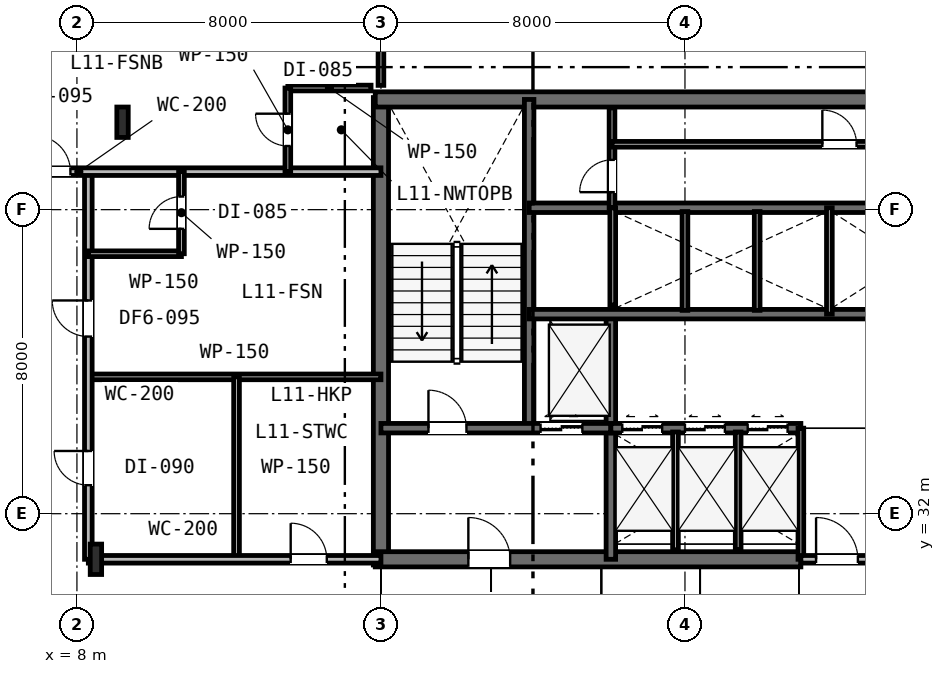
"""IFC4 building model, lengths in metres.
Left out: names, types, materials, properties, quantities, classifications, styles, units other than length and angle.
Written with IfcOpenShell. Run it as: python <this file> out.ifc"""

import sys

from ifc_helpers import new_model, si_unit, direction, frame, frame_2d, origin, origin_2d, place, context, subcontext, project, spatial, rectangle, i_section, extrude, element, fill, save


model = new_model("IFC4")
c1 = context("Model", 3, precision=1e-05, world=origin(), true_north=direction((0.0, 1.0)))
c2 = subcontext(c1, "Body", "Model", "MODEL_VIEW")
j1 = project(units=[si_unit("LENGTHUNIT", "METRE"), si_unit("PLANEANGLEUNIT", "RADIAN")], contexts=[c1])
p1 = place(None, origin())
s1 = spatial("IfcSite", under=j1, at=p1, CompositionType="ELEMENT")
p2 = place(p1, origin())
s2 = spatial("IfcBuilding", under=s1, at=p2, CompositionType="ELEMENT")
p3 = place(p2, frame((0.0, 0.0, 47.4)))
s3 = spatial("IfcBuildingStorey", under=s2, at=p3, CompositionType="ELEMENT", Elevation=47.4)
p4 = place(p3, frame((16.0, 30.65, 0.0), z_axis=(0.0, 0.0, 1.0), x_axis=(0.0, 1.0, 0.0)))
e1 = element("IfcWall", 1, at=p4, inside=s3, PredefinedType="SHEAR", context=c2, shape_type="SweptSolid", body=[
    extrude(rectangle(XDim=12.3, YDim=0.4, at=frame_2d((6.15, 0.0))), origin(), (0.0, 0.0, 1.0), 3.6),
])
p5 = place(p3, frame((15.85, 42.9, 0.0), z_axis=(0.0, 0.0, 1.0), x_axis=(1.0, 0.0, 0.0)))
e2 = element("IfcWall", 2, at=p5, inside=s3, PredefinedType="SHEAR", context=c2, shape_type="SweptSolid", body=[
    extrude(rectangle(XDim=24.3, YDim=0.4, at=frame_2d((12.15, 0.0))), origin(), (0.0, 0.0, 1.0), 3.6),
])
p6 = place(p3, frame((15.85, 30.8, 0.0), z_axis=(0.0, 0.0, 1.0), x_axis=(1.0, 0.0, 0.0)))
e3 = element("IfcWall", 3, at=p6, inside=s3, PredefinedType="SHEAR", context=c2, shape_type="SweptSolid", body=[
    extrude(rectangle(XDim=11.2, YDim=0.4, at=frame_2d((5.6, 0.0))), origin(), (0.0, 0.0, 1.0), 3.6),
])
p7 = place(p6, frame((2.45, 0.0, 0.0)))
e4 = element("IfcOpeningElement", 4, at=p7, cuts=e3, PredefinedType="OPENING", context=c2, shape_type="SweptSolid", body=[
    extrude(rectangle(XDim=1.1, YDim=2.15, at=frame_2d((0.55, 1.075))), frame((0.0, 0.21, 0.0), z_axis=(0.0, -1.0, 0.0), x_axis=(1.0, 0.0, 0.0)), (0.0, 0.0, 1.0), 0.42),
])
p8 = place(p3, frame((19.9, 34.25, 0.0), z_axis=(0.0, 0.0, 1.0), x_axis=(0.0, 1.0, 0.0)))
e5 = element("IfcWall", 5, at=p8, inside=s3, PredefinedType="SHEAR", context=c2, shape_type="SweptSolid", body=[
    extrude(rectangle(XDim=8.65, YDim=0.25, at=frame_2d((4.325, 0.0))), origin(), (0.0, 0.0, 1.0), 3.6),
])
p9 = place(p3, frame((22.05, 30.8, 0.0), z_axis=(0.0, 0.0, 1.0), x_axis=(0.0, 1.0, 0.0)))
e6 = element("IfcWall", 6, at=p9, inside=s3, PredefinedType="SHEAR", context=c2, shape_type="SweptSolid", body=[
    extrude(rectangle(XDim=6.45, YDim=0.25, at=frame_2d((3.225, 0.0))), origin(), (0.0, 0.0, 1.0), 3.6),
])
p10 = place(p3, frame((16.0, 34.25, 0.0), z_axis=(0.0, 0.0, 1.0), x_axis=(1.0, 0.0, 0.0)))
e7 = element("IfcWall", 7, at=p10, inside=s3, PredefinedType="SHEAR", context=c2, shape_type="SweptSolid", body=[
    extrude(rectangle(XDim=6.05, YDim=0.25, at=frame_2d((3.025, 0.0))), origin(), (0.0, 0.0, 1.0), 3.6),
])
p11 = place(p10, frame((1.25, 0.0, 0.0)))
e8 = element("IfcOpeningElement", 8, at=p11, cuts=e7, PredefinedType="OPENING", context=c2, shape_type="SweptSolid", body=[
    extrude(rectangle(XDim=1.0, YDim=2.15, at=frame_2d((0.5, 1.075))), frame((0.0, 0.135, 0.0), z_axis=(0.0, -1.0, 0.0), x_axis=(1.0, 0.0, 0.0)), (0.0, 0.0, 1.0), 0.27),
])
p12 = place(p10, frame((4.2, 0.0, 0.0)))
e9 = element("IfcOpeningElement", 9, at=p12, cuts=e7, PredefinedType="OPENING", context=c2, shape_type="SweptSolid", body=[
    extrude(rectangle(XDim=1.1, YDim=2.15, at=frame_2d((0.55, 1.075))), frame((0.0, 0.135, 0.0), z_axis=(0.0, -1.0, 0.0), x_axis=(1.0, 0.0, 0.0)), (0.0, 0.0, 1.0), 0.27),
])
p13 = place(p3, frame((22.05, 34.25, 0.0), z_axis=(0.0, 0.0, 1.0), x_axis=(1.0, 0.0, 0.0)))
e10 = element("IfcWall", 10, at=p13, inside=s3, PredefinedType="SHEAR", context=c2, shape_type="SweptSolid", body=[
    extrude(rectangle(XDim=5.0, YDim=0.25, at=frame_2d((2.5, 0.0))), origin(), (0.0, 0.0, 1.0), 3.6),
])
p14 = place(p13, frame((0.3, 0.0, 0.0)))
e11 = element("IfcOpeningElement", 11, at=p14, cuts=e10, PredefinedType="OPENING", context=c2, shape_type="SweptSolid", body=[
    extrude(rectangle(XDim=1.05, YDim=2.15, at=frame_2d((0.525, 1.075))), frame((0.0, 0.135, 0.0), z_axis=(0.0, -1.0, 0.0), x_axis=(1.0, 0.0, 0.0)), (0.0, 0.0, 1.0), 0.27),
])
p15 = place(p13, frame((1.95, 0.0, 0.0)))
e12 = element("IfcOpeningElement", 12, at=p15, cuts=e10, PredefinedType="OPENING", context=c2, shape_type="SweptSolid", body=[
    extrude(rectangle(XDim=1.05, YDim=2.15, at=frame_2d((0.525, 1.075))), frame((0.0, 0.135, 0.0), z_axis=(0.0, -1.0, 0.0), x_axis=(1.0, 0.0, 0.0)), (0.0, 0.0, 1.0), 0.27),
])
p16 = place(p13, frame((3.6, 0.0, 0.0)))
e13 = element("IfcOpeningElement", 13, at=p16, cuts=e10, PredefinedType="OPENING", context=c2, shape_type="SweptSolid", body=[
    extrude(rectangle(XDim=1.05, YDim=2.15, at=frame_2d((0.525, 1.075))), frame((0.0, 0.135, 0.0), z_axis=(0.0, -1.0, 0.0), x_axis=(1.0, 0.0, 0.0)), (0.0, 0.0, 1.0), 0.27),
])
p17 = place(p3, frame((19.9, 37.25, 0.0), z_axis=(0.0, 0.0, 1.0), x_axis=(1.0, 0.0, 0.0)))
e14 = element("IfcWall", 14, at=p17, inside=s3, PredefinedType="SHEAR", context=c2, shape_type="SweptSolid", body=[
    extrude(rectangle(XDim=16.2, YDim=0.25, at=frame_2d((8.1, 0.0))), origin(), (0.0, 0.0, 1.0), 3.6),
])
p18 = place(p17, frame((12.55, 0.0, 0.0)))
e15 = element("IfcOpeningElement", 15, at=p18, cuts=e14, PredefinedType="OPENING", context=c2, shape_type="SweptSolid", body=[
    extrude(rectangle(XDim=0.9, YDim=2.15, at=frame_2d((0.45, 1.075))), frame((0.0, 0.135, 0.0), z_axis=(0.0, -1.0, 0.0), x_axis=(1.0, 0.0, 0.0)), (0.0, 0.0, 1.0), 0.27),
])
p19 = place(p3, frame((19.9, 40.05, 0.0), z_axis=(0.0, 0.0, 1.0), x_axis=(1.0, 0.0, 0.0)))
e16 = element("IfcWall", 16, at=p19, inside=s3, PredefinedType="SHEAR", context=c2, shape_type="SweptSolid", body=[
    extrude(rectangle(XDim=12.05, YDim=0.25, at=frame_2d((6.025, 0.0))), origin(), (0.0, 0.0, 1.0), 3.6),
])
for number, where, z_axis, x_axis in (
    (17, (8.5, 30.8, 0.0), (0.0, 0.0, 1.0), (1.0, 0.0, 0.0)),
    (18, (9.2, 42.3, 0.0), (0.0, 0.0, 1.0), (1.0, 0.0, 0.0)),
):
    element("IfcColumn", number, at=place(p3, frame(where, z_axis=z_axis, x_axis=x_axis)), inside=s3, PredefinedType="COLUMN", context=c2, shape_type="SweptSolid", body=[
        extrude(i_section(OverallWidth=0.3, OverallDepth=0.8, WebThickness=0.018, FlangeThickness=0.033, FilletRadius=0.03, at=origin_2d()), origin(), (0.0, 0.0, 1.0), 3.6),
    ])
p20 = place(p3, frame((27.05, 30.8, 0.0), z_axis=(0.0, 0.0, 1.0), x_axis=(0.0, 1.0, 0.0)))
e19 = element("IfcWall", 19, at=p20, inside=s3, PredefinedType="PLUMBINGWALL", context=c2, shape_type="SweptSolid", body=[
    extrude(rectangle(XDim=3.45, YDim=0.15, at=frame_2d((1.725, 0.0))), origin(), (0.0, 0.0, 1.0), 3.33),
])
p21 = place(p3, frame((27.05, 30.8, 0.0), z_axis=(0.0, 0.0, 1.0), x_axis=(1.0, 0.0, 0.0)))
e20 = element("IfcWall", 20, at=p21, inside=s3, PredefinedType="PARTITIONING", context=c2, shape_type="SweptSolid", body=[
    extrude(rectangle(XDim=1.9, YDim=0.2, at=frame_2d((0.95, 0.0))), origin(), (0.0, 0.0, 1.0), 3.33),
])
p22 = place(p21, frame((0.4, 0.0, 0.0)))
e21 = element("IfcOpeningElement", 21, at=p22, cuts=e20, PredefinedType="OPENING", context=c2, shape_type="SweptSolid", body=[
    extrude(rectangle(XDim=1.1, YDim=2.15, at=frame_2d((0.55, 1.075))), frame((0.0, 0.11, 0.0), z_axis=(0.0, -1.0, 0.0), x_axis=(1.0, 0.0, 0.0)), (0.0, 0.0, 1.0), 0.22),
])
for number, where, z_axis, x_axis in (
    (22, (23.75, 31.05, 0.0), (0.0, 0.0, 1.0), (0.0, 1.0, 0.0)),
    (23, (25.4, 31.05, 0.0), (0.0, 0.0, 1.0), (0.0, 1.0, 0.0)),
):
    element("IfcWall", number, at=place(p3, frame(where, z_axis=z_axis, x_axis=x_axis)), inside=s3, PredefinedType="PLUMBINGWALL", context=c2, shape_type="SweptSolid", body=[
        extrude(rectangle(XDim=3.1, YDim=0.15, at=frame_2d((1.55, 0.0))), origin(), (0.0, 0.0, 1.0), 3.33),
    ])
p23 = place(p3, frame((22.1, 37.49, 0.0), z_axis=(0.0, 0.0, 1.0), x_axis=(0.0, 1.0, 0.0)))
e24 = element("IfcWall", 24, at=p23, inside=s3, PredefinedType="PLUMBINGWALL", context=c2, shape_type="SweptSolid", body=[
    extrude(rectangle(XDim=2.56, YDim=0.15, at=frame_2d((1.28, 0.0))), origin(), (0.0, 0.0, 1.0), 3.33),
])
p24 = place(p3, frame((27.8, 37.25, 0.0), z_axis=(0.0, 0.0, 1.0), x_axis=(0.0, 1.0, 0.0)))
e25 = element("IfcWall", 25, at=p24, inside=s3, PredefinedType="PLUMBINGWALL", context=c2, shape_type="SweptSolid", body=[
    extrude(rectangle(XDim=2.8, YDim=0.15, at=frame_2d((1.4, 0.0))), origin(), (0.0, 0.0, 1.0), 3.33),
])
for number, where, z_axis, x_axis in (
    (26, (24.0, 37.35, 0.0), (0.0, 0.0, 1.0), (0.0, 1.0, 0.0)),
    (27, (25.9, 37.35, 0.0), (0.0, 0.0, 1.0), (0.0, 1.0, 0.0)),
):
    element("IfcWall", number, at=place(p3, frame(where, z_axis=z_axis, x_axis=x_axis)), inside=s3, PredefinedType="PLUMBINGWALL", context=c2, shape_type="SweptSolid", body=[
        extrude(rectangle(XDim=2.6, YDim=0.15, at=frame_2d((1.3, 0.0))), origin(), (0.0, 0.0, 1.0), 3.33),
    ])
p25 = place(p3, frame((22.08, 40.05, 0.0), z_axis=(0.0, 0.0, 1.0), x_axis=(0.0, 1.0, 0.0)))
e28 = element("IfcWall", 28, at=p25, inside=s3, PredefinedType="PARTITIONING", context=c2, shape_type="SweptSolid", body=[
    extrude(rectangle(XDim=2.63, YDim=0.15, at=frame_2d((1.315, 0.0))), origin(), (0.0, 0.0, 1.0), 3.33),
])
p26 = place(p25, frame((0.41, 0.0, 0.0)))
e29 = element("IfcOpeningElement", 29, at=p26, cuts=e28, PredefinedType="OPENING", context=c2, shape_type="SweptSolid", body=[
    extrude(rectangle(XDim=0.85, YDim=2.15, at=frame_2d((0.425, 1.075))), frame((0.0, 0.085, 0.0), z_axis=(0.0, -1.0, 0.0), x_axis=(1.0, 0.0, 0.0)), (0.0, 0.0, 1.0), 0.17),
])
p27 = place(p3, frame((22.08, 41.72, 0.0), z_axis=(0.0, 0.0, 1.0), x_axis=(1.0, 0.0, 0.0)))
e30 = element("IfcWall", 30, at=p27, inside=s3, PredefinedType="PARTITIONING", context=c2, shape_type="SweptSolid", body=[
    extrude(rectangle(XDim=11.97, YDim=0.15, at=frame_2d((5.985, 0.0))), origin(), (0.0, 0.0, 1.0), 3.33),
])
p28 = place(p27, frame((5.535, 0.0, 0.0)))
e31 = element("IfcOpeningElement", 31, at=p28, cuts=e30, PredefinedType="OPENING", context=c2, shape_type="SweptSolid", body=[
    extrude(rectangle(XDim=0.9, YDim=2.15, at=frame_2d((0.45, 1.075))), frame((0.0, 0.085, 0.0), z_axis=(0.0, -1.0, 0.0), x_axis=(1.0, 0.0, 0.0)), (0.0, 0.0, 1.0), 0.17),
])
p29 = place(p3, frame((8.3, 35.6, 0.0), z_axis=(0.0, 0.0, 1.0), x_axis=(1.0, 0.0, 0.0)))
e32 = element("IfcWall", 32, at=p29, inside=s3, PredefinedType="PARTITIONING", context=c2, shape_type="SweptSolid", body=[
    extrude(rectangle(XDim=7.7, YDim=0.15, at=frame_2d((3.85, 0.0))), origin(), (0.0, 0.0, 1.0), 2.82),
])
p30 = place(p3, frame((12.2, 30.8, 0.0), z_axis=(0.0, 0.0, 1.0), x_axis=(0.0, 1.0, 0.0)))
e33 = element("IfcWall", 33, at=p30, inside=s3, PredefinedType="PARTITIONING", context=c2, shape_type="SweptSolid", body=[
    extrude(rectangle(XDim=4.8, YDim=0.15, at=frame_2d((2.4, 0.0))), origin(), (0.0, 0.0, 1.0), 2.82),
])
p31 = place(p3, frame((8.3, 30.8, 0.0), z_axis=(0.0, 0.0, 1.0), x_axis=(1.0, 0.0, 0.0)))
e34 = element("IfcWall", 34, at=p31, inside=s3, PredefinedType="PARTITIONING", context=c2, shape_type="SweptSolid", body=[
    extrude(rectangle(XDim=7.7, YDim=0.2, at=frame_2d((3.85, 0.0))), origin(), (0.0, 0.0, 1.0), 2.82),
])
p32 = place(p31, frame((5.325, 0.0, 0.0)))
e35 = element("IfcOpeningElement", 35, at=p32, cuts=e34, PredefinedType="OPENING", context=c2, shape_type="SweptSolid", body=[
    extrude(rectangle(XDim=0.95, YDim=2.15, at=frame_2d((0.475, 1.075))), frame((0.0, 0.11, 0.0), z_axis=(0.0, -1.0, 0.0), x_axis=(1.0, 0.0, 0.0)), (0.0, 0.0, 1.0), 0.22),
])
p33 = place(p3, frame((8.3, 30.8, 0.0), z_axis=(0.0, 0.0, 1.0), x_axis=(0.0, 1.0, 0.0)))
e36 = element("IfcWall", 36, at=p33, inside=s3, PredefinedType="PARTITIONING", context=c2, shape_type="SweptSolid", body=[
    extrude(rectangle(XDim=10.2, YDim=0.2, at=frame_2d((5.1, 0.0))), origin(), (0.0, 0.0, 1.0), 2.82),
])
p34 = place(p33, frame((1.95, 0.0, 0.0)))
e37 = element("IfcOpeningElement", 37, at=p34, cuts=e36, PredefinedType="OPENING", context=c2, shape_type="SweptSolid", body=[
    extrude(rectangle(XDim=0.9, YDim=2.15, at=frame_2d((0.45, 1.075))), frame((0.0, 0.11, 0.0), z_axis=(0.0, -1.0, 0.0), x_axis=(1.0, 0.0, 0.0)), (0.0, 0.0, 1.0), 0.22),
])
p35 = place(p33, frame((5.861, 0.0, 0.0)))
e38 = element("IfcOpeningElement", 38, at=p35, cuts=e36, PredefinedType="OPENING", context=c2, shape_type="SweptSolid", body=[
    extrude(rectangle(XDim=0.95, YDim=2.15, at=frame_2d((0.475, 1.075))), frame((0.0, 0.11, 0.0), z_axis=(0.0, -1.0, 0.0), x_axis=(1.0, 0.0, 0.0)), (0.0, 0.0, 1.0), 0.22),
])
p36 = place(p3, frame((0.1, 41.0, 0.0), z_axis=(0.0, 0.0, 1.0), x_axis=(1.0, 0.0, 0.0)))
e39 = element("IfcWall", 39, at=p36, inside=s3, PredefinedType="PARTITIONING", context=c2, shape_type="SweptSolid", body=[
    extrude(rectangle(XDim=15.9, YDim=0.2, at=frame_2d((7.95, 0.0))), origin(), (0.0, 0.0, 1.0), 2.82),
])
p37 = place(p36, frame((6.779, 0.0, 0.0)))
e40 = element("IfcOpeningElement", 40, at=p37, cuts=e39, PredefinedType="OPENING", context=c2, shape_type="SweptSolid", body=[
    extrude(rectangle(XDim=0.95, YDim=2.15, at=frame_2d((0.475, 1.075))), frame((0.0, 0.11, 0.0), z_axis=(0.0, -1.0, 0.0), x_axis=(1.0, 0.0, 0.0)), (0.0, 0.0, 1.0), 0.22),
])
p38 = place(p3, frame((13.55, 43.2, 0.0), z_axis=(0.0, 0.0, 1.0), x_axis=(1.0, 0.0, 0.0)))
e41 = element("IfcWall", 41, at=p38, inside=s3, PredefinedType="PARTITIONING", context=c2, shape_type="SweptSolid", body=[
    extrude(rectangle(XDim=2.19, YDim=0.15, at=frame_2d((1.095, 0.0))), origin(), (0.0, 0.0, 1.0), 3.33),
])
p39 = place(p3, frame((13.55, 41.0, 0.0), z_axis=(0.0, 0.0, 1.0), x_axis=(0.0, 1.0, 0.0)))
e42 = element("IfcWall", 42, at=p39, inside=s3, PredefinedType="PARTITIONING", context=c2, shape_type="SweptSolid", body=[
    extrude(rectangle(XDim=2.2, YDim=0.15, at=frame_2d((1.1, 0.0))), origin(), (0.0, 0.0, 1.0), 3.33),
])
p40 = place(p39, frame((0.675, 0.0, 0.0)))
e43 = element("IfcOpeningElement", 43, at=p40, cuts=e42, PredefinedType="OPENING", context=c2, shape_type="SweptSolid", body=[
    extrude(rectangle(XDim=0.85, YDim=2.15, at=frame_2d((0.425, 1.075))), frame((0.0, 0.085, 0.0), z_axis=(0.0, -1.0, 0.0), x_axis=(1.0, 0.0, 0.0)), (0.0, 0.0, 1.0), 0.17),
])
p41 = place(p3, frame((8.3, 38.84, 0.0), z_axis=(0.0, 0.0, 1.0), x_axis=(1.0, 0.0, 0.0)))
e44 = element("IfcWall", 44, at=p41, inside=s3, PredefinedType="PARTITIONING", context=c2, shape_type="SweptSolid", body=[
    extrude(rectangle(XDim=2.45, YDim=0.15, at=frame_2d((1.225, 0.0))), origin(), (0.0, 0.0, 1.0), 2.82),
])
p42 = place(p3, frame((10.75, 38.84, 0.0), z_axis=(0.0, 0.0, 1.0), x_axis=(0.0, 1.0, 0.0)))
e45 = element("IfcWall", 45, at=p42, inside=s3, PredefinedType="PARTITIONING", context=c2, shape_type="SweptSolid", body=[
    extrude(rectangle(XDim=2.16, YDim=0.15, at=frame_2d((1.08, 0.0))), origin(), (0.0, 0.0, 1.0), 3.33),
])
p43 = place(p42, frame((0.655, 0.0, 0.0)))
e46 = element("IfcOpeningElement", 46, at=p43, cuts=e45, PredefinedType="OPENING", context=c2, shape_type="SweptSolid", body=[
    extrude(rectangle(XDim=0.85, YDim=2.15, at=frame_2d((0.425, 1.075))), frame((0.0, 0.085, 0.0), z_axis=(0.0, -1.0, 0.0), x_axis=(1.0, 0.0, 0.0)), (0.0, 0.0, 1.0), 0.17),
])
p44 = place(p3, frame((16.0, 43.27, 0.0), z_axis=(0.0, 0.0, 1.0), x_axis=(0.0, 1.0, 0.0)))
e47 = element("IfcWall", 47, at=p44, inside=s3, PredefinedType="PARTITIONING", context=c2, shape_type="SweptSolid", body=[
    extrude(rectangle(XDim=4.63, YDim=0.15, at=frame_2d((2.315, 0.0))), origin(), (0.0, 0.0, 1.0), 2.93),
])
p45 = place(p22, origin())
e48 = element("IfcDoor", 48, at=p45, inside=s3, OperationType="SINGLE_SWING_LEFT", PredefinedType="DOOR", context=c2, shape_type="SweptSolid", body=[
    extrude(rectangle(XDim=1.1, YDim=2.15, at=frame_2d((0.55, 1.075))), frame((0.0, 0.025, 0.0), z_axis=(0.0, -1.0, 0.0), x_axis=(1.0, 0.0, 0.0)), (0.0, 0.0, 1.0), 0.05),
])
fill(e21, e48)
p46 = place(p11, origin())
e49 = element("IfcDoor", 49, at=p46, inside=s3, OperationType="SINGLE_SWING_LEFT", PredefinedType="DOOR", context=c2, shape_type="SweptSolid", body=[
    extrude(rectangle(XDim=1.0, YDim=2.15, at=frame_2d((0.5, 1.075))), frame((0.0, 0.025, 0.0), z_axis=(0.0, -1.0, 0.0), x_axis=(1.0, 0.0, 0.0)), (0.0, 0.0, 1.0), 0.05),
])
fill(e8, e49)
p47 = place(p7, origin())
e50 = element("IfcDoor", 50, at=p47, inside=s3, OperationType="SINGLE_SWING_LEFT", PredefinedType="DOOR", context=c2, shape_type="SweptSolid", body=[
    extrude(rectangle(XDim=1.1, YDim=2.15, at=frame_2d((0.55, 1.075))), frame((0.0, 0.025, 0.0), z_axis=(0.0, -1.0, 0.0), x_axis=(1.0, 0.0, 0.0)), (0.0, 0.0, 1.0), 0.05),
])
fill(e4, e50)
p48 = place(p26, origin())
e51 = element("IfcDoor", 51, at=p48, inside=s3, OperationType="SINGLE_SWING_LEFT", PredefinedType="DOOR", context=c2, shape_type="SweptSolid", body=[
    extrude(rectangle(XDim=0.85, YDim=2.15, at=frame_2d((0.425, 1.075))), frame((0.0, 0.025, 0.0), z_axis=(0.0, -1.0, 0.0), x_axis=(1.0, 0.0, 0.0)), (0.0, 0.0, 1.0), 0.05),
])
fill(e29, e51)
p49 = place(p28, origin())
e52 = element("IfcDoor", 52, at=p49, inside=s3, OperationType="SINGLE_SWING_LEFT", PredefinedType="DOOR", context=c2, shape_type="SweptSolid", body=[
    extrude(rectangle(XDim=0.9, YDim=2.15, at=frame_2d((0.45, 1.075))), frame((0.0, 0.025, 0.0), z_axis=(0.0, -1.0, 0.0), x_axis=(1.0, 0.0, 0.0)), (0.0, 0.0, 1.0), 0.05),
])
fill(e31, e52)
p50 = place(p32, origin())
e53 = element("IfcDoor", 53, at=p50, inside=s3, OperationType="SINGLE_SWING_LEFT", PredefinedType="DOOR", context=c2, shape_type="SweptSolid", body=[
    extrude(rectangle(XDim=0.95, YDim=2.15, at=frame_2d((0.475, 1.075))), frame((0.0, 0.025, 0.0), z_axis=(0.0, -1.0, 0.0), x_axis=(1.0, 0.0, 0.0)), (0.0, 0.0, 1.0), 0.05),
])
fill(e35, e53)
p51 = place(p34, origin())
e54 = element("IfcDoor", 54, at=p51, inside=s3, OperationType="SINGLE_SWING_RIGHT", PredefinedType="DOOR", context=c2, shape_type="SweptSolid", body=[
    extrude(rectangle(XDim=0.9, YDim=2.15, at=frame_2d((0.45, 1.075))), frame((0.0, 0.025, 0.0), z_axis=(0.0, -1.0, 0.0), x_axis=(1.0, 0.0, 0.0)), (0.0, 0.0, 1.0), 0.05),
])
fill(e37, e54)
p52 = place(p37, origin())
e55 = element("IfcDoor", 55, at=p52, inside=s3, OperationType="SINGLE_SWING_LEFT", PredefinedType="DOOR", context=c2, shape_type="SweptSolid", body=[
    extrude(rectangle(XDim=0.95, YDim=2.15, at=frame_2d((0.475, 1.075))), frame((0.0, 0.025, 0.0), z_axis=(0.0, -1.0, 0.0), x_axis=(1.0, 0.0, 0.0)), (0.0, 0.0, 1.0), 0.05),
])
fill(e40, e55)
p53 = place(p40, origin())
e56 = element("IfcDoor", 56, at=p53, inside=s3, OperationType="SINGLE_SWING_RIGHT", PredefinedType="DOOR", context=c2, shape_type="SweptSolid", body=[
    extrude(rectangle(XDim=0.85, YDim=2.15, at=frame_2d((0.425, 1.075))), frame((0.0, 0.025, 0.0), z_axis=(0.0, -1.0, 0.0), x_axis=(1.0, 0.0, 0.0)), (0.0, 0.0, 1.0), 0.05),
])
fill(e43, e56)
p54 = place(p35, origin())
e57 = element("IfcDoor", 57, at=p54, inside=s3, OperationType="SINGLE_SWING_RIGHT", PredefinedType="DOOR", context=c2, shape_type="SweptSolid", body=[
    extrude(rectangle(XDim=0.95, YDim=2.15, at=frame_2d((0.475, 1.075))), frame((0.0, 0.025, 0.0), z_axis=(0.0, -1.0, 0.0), x_axis=(1.0, 0.0, 0.0)), (0.0, 0.0, 1.0), 0.05),
])
fill(e38, e57)
p55 = place(p43, origin())
e58 = element("IfcDoor", 58, at=p55, inside=s3, OperationType="SINGLE_SWING_LEFT", PredefinedType="DOOR", context=c2, shape_type="SweptSolid", body=[
    extrude(rectangle(XDim=0.85, YDim=2.15, at=frame_2d((0.425, 1.075))), frame((0.0, 0.025, 0.0), z_axis=(0.0, -1.0, 0.0), x_axis=(1.0, 0.0, 0.0)), (0.0, 0.0, 1.0), 0.05),
])
fill(e46, e58)
p56 = place(p12, origin())
e59 = element("IfcDoor", 59, at=p56, inside=s3, OperationType="DOUBLE_DOOR_SLIDING", PredefinedType="DOOR", context=c2, shape_type="SweptSolid", body=[
    extrude(rectangle(XDim=1.1, YDim=2.15, at=frame_2d((0.55, 1.075))), frame((0.0, 0.025, 0.0), z_axis=(0.0, -1.0, 0.0), x_axis=(1.0, 0.0, 0.0)), (0.0, 0.0, 1.0), 0.05),
])
fill(e9, e59)
p57 = place(p14, origin())
e60 = element("IfcDoor", 60, at=p57, inside=s3, OperationType="DOUBLE_DOOR_SLIDING", PredefinedType="DOOR", context=c2, shape_type="SweptSolid", body=[
    extrude(rectangle(XDim=1.05, YDim=2.15, at=frame_2d((0.525, 1.075))), frame((0.0, 0.025, 0.0), z_axis=(0.0, -1.0, 0.0), x_axis=(1.0, 0.0, 0.0)), (0.0, 0.0, 1.0), 0.05),
])
fill(e11, e60)
p58 = place(p15, origin())
e61 = element("IfcDoor", 61, at=p58, inside=s3, OperationType="DOUBLE_DOOR_SLIDING", PredefinedType="DOOR", context=c2, shape_type="SweptSolid", body=[
    extrude(rectangle(XDim=1.05, YDim=2.15, at=frame_2d((0.525, 1.075))), frame((0.0, 0.025, 0.0), z_axis=(0.0, -1.0, 0.0), x_axis=(1.0, 0.0, 0.0)), (0.0, 0.0, 1.0), 0.05),
])
fill(e12, e61)
p59 = place(p16, origin())
e62 = element("IfcDoor", 62, at=p59, inside=s3, OperationType="DOUBLE_DOOR_SLIDING", PredefinedType="DOOR", context=c2, shape_type="SweptSolid", body=[
    extrude(rectangle(XDim=1.05, YDim=2.15, at=frame_2d((0.525, 1.075))), frame((0.0, 0.025, 0.0), z_axis=(0.0, -1.0, 0.0), x_axis=(1.0, 0.0, 0.0)), (0.0, 0.0, 1.0), 0.05),
])
fill(e13, e62)
save(model, sys.argv[1])
